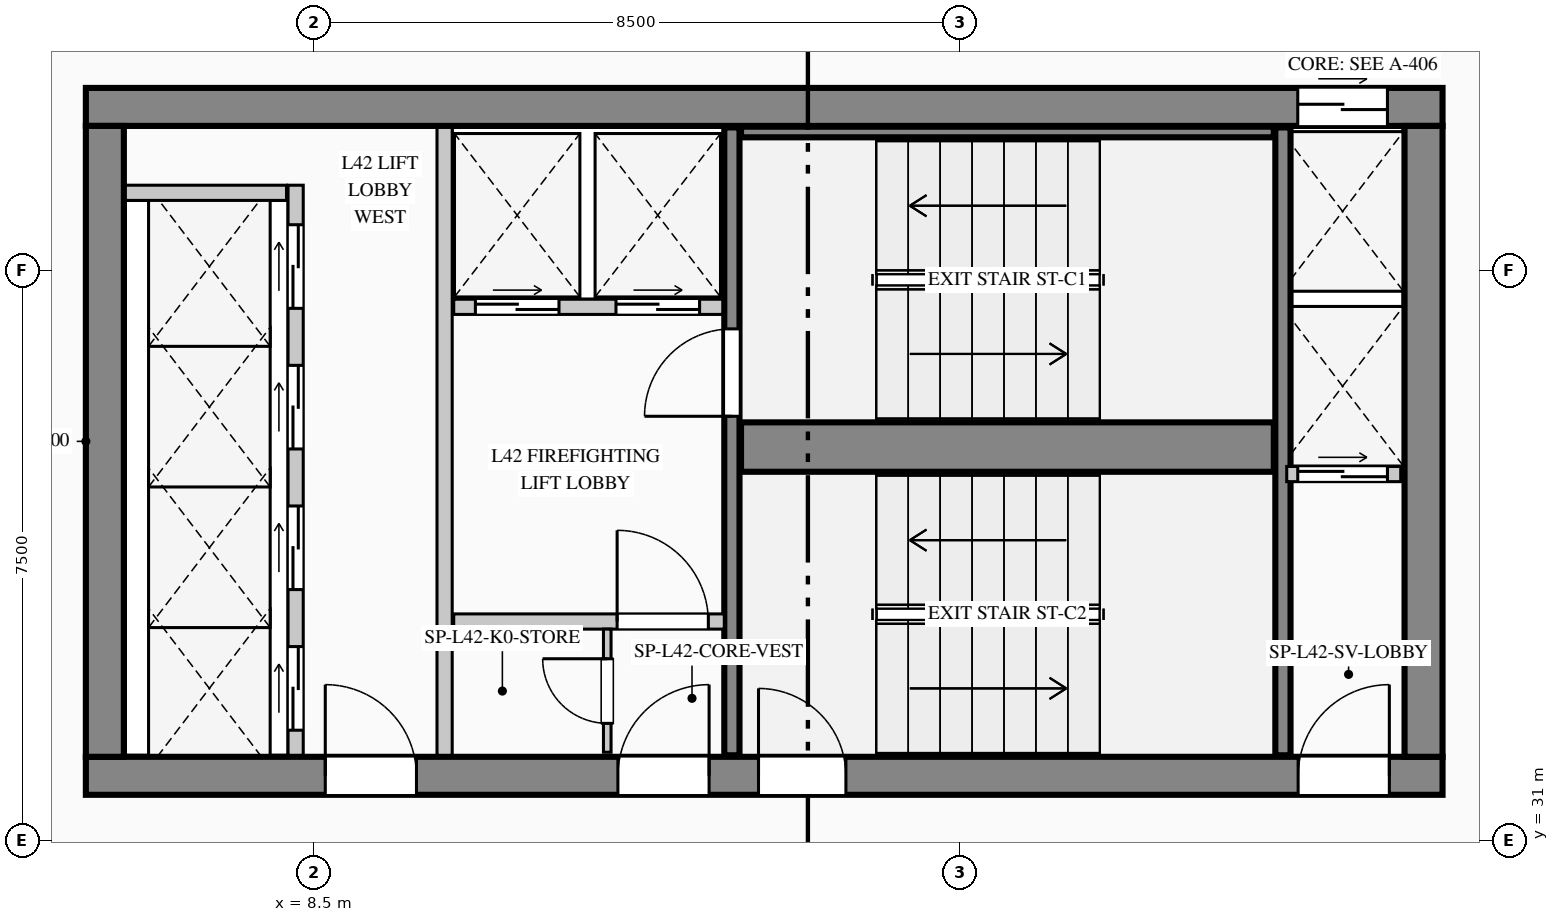
"""IFC4 building model, lengths in metres.
Left out: names, types, materials, properties, quantities, classifications, styles, units other than length and angle.
Written with IfcOpenShell. Run it as: python <this file> out.ifc"""

import sys

from ifc_helpers import new_model, si_unit, direction, frame, frame_2d, origin, place, context, subcontext, project, spatial, rectangle, extrude, element, fill, save


model = new_model("IFC4")
c1 = context("Model", 3, precision=1e-05, world=origin(), true_north=direction((0.0, 1.0)))
c2 = subcontext(c1, "Body", "Model", "MODEL_VIEW")
j1 = project(units=[si_unit("LENGTHUNIT", "METRE"), si_unit("PLANEANGLEUNIT", "RADIAN")], contexts=[c1])
p1 = place(None, origin())
s1 = spatial("IfcSite", under=j1, at=p1, CompositionType="ELEMENT")
p2 = place(p1, origin())
s2 = spatial("IfcBuilding", under=s1, at=p2, CompositionType="ELEMENT")
p3 = place(p2, frame((0.0, 0.0, 178.55)))
s3 = spatial("IfcBuildingStorey", under=s2, at=p3, CompositionType="ELEMENT", Elevation=178.55)
p4 = place(p3, frame((5.5, 40.65, 0.0), z_axis=(0.0, 0.0, 1.0), x_axis=(1.0, 0.0, 0.0)))
e1 = element("IfcWall", 1, at=p4, inside=s3, PredefinedType="SHEAR", context=c2, shape_type="SweptSolid", body=[
    extrude(rectangle(XDim=17.85, YDim=0.5, at=frame_2d((8.925, 0.0))), origin(), (0.0, 0.0, 1.0), 5.2),
])
p5 = place(p4, frame((15.945, 0.0, 0.0)))
e2 = element("IfcOpeningElement", 2, at=p5, cuts=e1, PredefinedType="OPENING", context=c2, shape_type="SweptSolid", body=[
    extrude(rectangle(XDim=1.18, YDim=2.25, at=frame_2d((0.59, 1.125))), frame((0.0, 0.26, 0.0), z_axis=(0.0, -1.0, 0.0), x_axis=(1.0, 0.0, 0.0)), (0.0, 0.0, 1.0), 0.52),
])
p6 = place(p3, frame((5.5, 31.85, 0.0), z_axis=(0.0, 0.0, 1.0), x_axis=(1.0, 0.0, 0.0)))
e3 = element("IfcWall", 3, at=p6, inside=s3, PredefinedType="SHEAR", context=c2, shape_type="SweptSolid", body=[
    extrude(rectangle(XDim=17.85, YDim=0.5, at=frame_2d((8.925, 0.0))), origin(), (0.0, 0.0, 1.0), 5.2),
])
p7 = place(p6, frame((3.15, 0.0, 0.0)))
e4 = element("IfcOpeningElement", 4, at=p7, cuts=e3, PredefinedType="OPENING", context=c2, shape_type="SweptSolid", body=[
    extrude(rectangle(XDim=1.2, YDim=2.2, at=frame_2d((0.6, 1.1))), frame((0.0, 0.26, 0.0), z_axis=(0.0, -1.0, 0.0), x_axis=(1.0, 0.0, 0.0)), (0.0, 0.0, 1.0), 0.52),
])
p8 = place(p6, frame((7.0, 0.0, 0.0)))
e5 = element("IfcOpeningElement", 5, at=p8, cuts=e3, PredefinedType="OPENING", context=c2, shape_type="SweptSolid", body=[
    extrude(rectangle(XDim=1.2, YDim=2.2, at=frame_2d((0.6, 1.1))), frame((0.0, 0.26, 0.0), z_axis=(0.0, -1.0, 0.0), x_axis=(1.0, 0.0, 0.0)), (0.0, 0.0, 1.0), 0.52),
])
p9 = place(p6, frame((8.85, 0.0, 0.0)))
e6 = element("IfcOpeningElement", 6, at=p9, cuts=e3, PredefinedType="OPENING", context=c2, shape_type="SweptSolid", body=[
    extrude(rectangle(XDim=1.15, YDim=2.2, at=frame_2d((0.575, 1.1))), frame((0.0, 0.26, 0.0), z_axis=(0.0, -1.0, 0.0), x_axis=(1.0, 0.0, 0.0)), (0.0, 0.0, 1.0), 0.52),
])
p10 = place(p6, frame((15.95, 0.0, 0.0)))
e7 = element("IfcOpeningElement", 7, at=p10, cuts=e3, PredefinedType="OPENING", context=c2, shape_type="SweptSolid", body=[
    extrude(rectangle(XDim=1.2, YDim=2.2, at=frame_2d((0.6, 1.1))), frame((0.0, 0.26, 0.0), z_axis=(0.0, -1.0, 0.0), x_axis=(1.0, 0.0, 0.0)), (0.0, 0.0, 1.0), 0.52),
])
for number, where, z_axis, x_axis in (
    (8, (5.75, 32.1, 0.0), (0.0, 0.0, 1.0), (0.0, 1.0, 0.0)),
    (9, (23.1, 32.1, 0.0), (0.0, 0.0, 1.0), (0.0, 1.0, 0.0)),
):
    element("IfcWall", number, at=place(p3, frame(where, z_axis=z_axis, x_axis=x_axis)), inside=s3, PredefinedType="SHEAR", context=c2, shape_type="SweptSolid", body=[
        extrude(rectangle(XDim=8.3, YDim=0.5, at=frame_2d((4.15, 0.0))), origin(), (0.0, 0.0, 1.0), 5.2),
    ])
p11 = place(p3, frame((14.0, 32.12, 0.0), z_axis=(0.0, 0.0, 1.0), x_axis=(0.0, 1.0, 0.0)))
e10 = element("IfcWall", 10, at=p11, inside=s3, PredefinedType="SHEAR", context=c2, shape_type="SweptSolid", body=[
    extrude(rectangle(XDim=8.26, YDim=0.2, at=frame_2d((4.13, 0.0))), origin(), (0.0, 0.0, 1.0), 5.2),
])
p12 = place(p11, frame((4.46, 0.0, 0.0)))
e11 = element("IfcOpeningElement", 11, at=p12, cuts=e10, PredefinedType="OPENING", context=c2, shape_type="SweptSolid", body=[
    extrude(rectangle(XDim=1.15, YDim=2.2, at=frame_2d((0.575, 1.1))), frame((0.0, 0.11, 0.0), z_axis=(0.0, -1.0, 0.0), x_axis=(1.0, 0.0, 0.0)), (0.0, 0.0, 1.0), 0.22),
])
p13 = place(p3, frame((14.12, 36.175, 0.0), z_axis=(0.0, 0.0, 1.0), x_axis=(1.0, 0.0, 0.0)))
e12 = element("IfcWall", 12, at=p13, inside=s3, PredefinedType="SHEAR", context=c2, shape_type="SweptSolid", body=[
    extrude(rectangle(XDim=7.01, YDim=0.65, at=frame_2d((3.505, 0.0))), origin(), (0.0, 0.0, 1.0), 5.2),
])
p14 = place(p3, frame((21.25, 32.12, 0.0), z_axis=(0.0, 0.0, 1.0), x_axis=(0.0, 1.0, 0.0)))
e13 = element("IfcWall", 13, at=p14, inside=s3, PredefinedType="SHEAR", context=c2, shape_type="SweptSolid", body=[
    extrude(rectangle(XDim=8.26, YDim=0.2, at=frame_2d((4.13, 0.0))), origin(), (0.0, 0.0, 1.0), 5.2),
])
p15 = place(p3, frame((14.12, 40.32, 0.0), z_axis=(0.0, 0.0, 1.0), x_axis=(1.0, 0.0, 0.0)))
e14 = element("IfcWall", 14, at=p15, inside=s3, PredefinedType="SHEAR", context=c2, shape_type="SweptSolid", body=[
    extrude(rectangle(XDim=7.01, YDim=0.14, at=frame_2d((3.505, 0.0))), origin(), (0.0, 0.0, 1.0), 5.2),
])
p16 = place(p3, frame((7.469, 4.63, 0.0), z_axis=(0.0, 0.0, 1.0), x_axis=(-0.123515300309, 0.992342667928, 0.0)))
e15 = element("IfcWall", 15, at=p16, inside=s3, PredefinedType="STANDARD", context=c2, shape_type="SweptSolid", body=[
    extrude(rectangle(XDim=37.024, YDim=0.26, at=frame_2d((18.512, 0.0))), origin(), (0.0, 0.0, 1.0), 4.95),
])
p17 = place(p3, frame((8.26, 32.12, 0.0), z_axis=(0.0, 0.0, 1.0), x_axis=(0.0, 1.0, 0.0)))
e16 = element("IfcWall", 16, at=p17, inside=s3, PredefinedType="PARTITIONING", context=c2, shape_type="SweptSolid", body=[
    extrude(rectangle(XDim=7.5, YDim=0.2, at=frame_2d((3.75, 0.0))), origin(), (0.0, 0.0, 1.0), 4.95),
])
p18 = place(p17, frame((0.33, 0.0, 0.0)))
e17 = element("IfcOpeningElement", 17, at=p18, cuts=e16, PredefinedType="OPENING", context=c2, shape_type="SweptSolid", body=[
    extrude(rectangle(XDim=1.1, YDim=2.2, at=frame_2d((0.55, 1.1))), frame((0.0, 0.11, 0.0), z_axis=(0.0, -1.0, 0.0), x_axis=(1.0, 0.0, 0.0)), (0.0, 0.0, 1.0), 0.22),
])
p19 = place(p17, frame((2.18, 0.0, 0.0)))
e18 = element("IfcOpeningElement", 18, at=p19, cuts=e16, PredefinedType="OPENING", context=c2, shape_type="SweptSolid", body=[
    extrude(rectangle(XDim=1.1, YDim=2.2, at=frame_2d((0.55, 1.1))), frame((0.0, 0.11, 0.0), z_axis=(0.0, -1.0, 0.0), x_axis=(1.0, 0.0, 0.0)), (0.0, 0.0, 1.0), 0.22),
])
p20 = place(p17, frame((4.03, 0.0, 0.0)))
e19 = element("IfcOpeningElement", 19, at=p20, cuts=e16, PredefinedType="OPENING", context=c2, shape_type="SweptSolid", body=[
    extrude(rectangle(XDim=1.1, YDim=2.2, at=frame_2d((0.55, 1.1))), frame((0.0, 0.11, 0.0), z_axis=(0.0, -1.0, 0.0), x_axis=(1.0, 0.0, 0.0)), (0.0, 0.0, 1.0), 0.22),
])
p21 = place(p17, frame((5.88, 0.0, 0.0)))
e20 = element("IfcOpeningElement", 20, at=p21, cuts=e16, PredefinedType="OPENING", context=c2, shape_type="SweptSolid", body=[
    extrude(rectangle(XDim=1.1, YDim=2.2, at=frame_2d((0.55, 1.1))), frame((0.0, 0.11, 0.0), z_axis=(0.0, -1.0, 0.0), x_axis=(1.0, 0.0, 0.0)), (0.0, 0.0, 1.0), 0.22),
])
p22 = place(p3, frame((6.02, 39.52, 0.0), z_axis=(0.0, 0.0, 1.0), x_axis=(1.0, 0.0, 0.0)))
e21 = element("IfcWall", 21, at=p22, inside=s3, PredefinedType="PARTITIONING", context=c2, shape_type="SweptSolid", body=[
    extrude(rectangle(XDim=2.12, YDim=0.2, at=frame_2d((1.06, 0.0))), origin(), (0.0, 0.0, 1.0), 4.95),
])
p23 = place(p3, frame((10.22, 32.12, 0.0), z_axis=(0.0, 0.0, 1.0), x_axis=(0.0, 1.0, 0.0)))
e22 = element("IfcWall", 22, at=p23, inside=s3, PredefinedType="PARTITIONING", context=c2, shape_type="SweptSolid", body=[
    extrude(rectangle(XDim=8.26, YDim=0.2, at=frame_2d((4.13, 0.0))), origin(), (0.0, 0.0, 1.0), 4.95),
])
p24 = place(p3, frame((10.34, 38.02, 0.0), z_axis=(0.0, 0.0, 1.0), x_axis=(1.0, 0.0, 0.0)))
e23 = element("IfcWall", 23, at=p24, inside=s3, PredefinedType="PARTITIONING", context=c2, shape_type="SweptSolid", body=[
    extrude(rectangle(XDim=3.54, YDim=0.2, at=frame_2d((1.77, 0.0))), origin(), (0.0, 0.0, 1.0), 4.95),
])
p25 = place(p24, frame((0.285, 0.0, 0.0)))
e24 = element("IfcOpeningElement", 24, at=p25, cuts=e23, PredefinedType="OPENING", context=c2, shape_type="SweptSolid", body=[
    extrude(rectangle(XDim=1.1, YDim=2.2, at=frame_2d((0.55, 1.1))), frame((0.0, 0.11, 0.0), z_axis=(0.0, -1.0, 0.0), x_axis=(1.0, 0.0, 0.0)), (0.0, 0.0, 1.0), 0.22),
])
p26 = place(p24, frame((2.135, 0.0, 0.0)))
e25 = element("IfcOpeningElement", 25, at=p26, cuts=e23, PredefinedType="OPENING", context=c2, shape_type="SweptSolid", body=[
    extrude(rectangle(XDim=1.1, YDim=2.2, at=frame_2d((0.55, 1.1))), frame((0.0, 0.11, 0.0), z_axis=(0.0, -1.0, 0.0), x_axis=(1.0, 0.0, 0.0)), (0.0, 0.0, 1.0), 0.22),
])
p27 = place(p3, frame((10.34, 33.88, 0.0), z_axis=(0.0, 0.0, 1.0), x_axis=(1.0, 0.0, 0.0)))
e26 = element("IfcWall", 26, at=p27, inside=s3, PredefinedType="PARTITIONING", context=c2, shape_type="SweptSolid", body=[
    extrude(rectangle(XDim=3.56, YDim=0.2, at=frame_2d((1.78, 0.0))), origin(), (0.0, 0.0, 1.0), 4.95),
])
p28 = place(p27, frame((2.15, 0.0, 0.0)))
e27 = element("IfcOpeningElement", 27, at=p28, cuts=e26, PredefinedType="OPENING", context=c2, shape_type="SweptSolid", body=[
    extrude(rectangle(XDim=1.2, YDim=2.2, at=frame_2d((0.6, 1.1))), frame((0.0, 0.11, 0.0), z_axis=(0.0, -1.0, 0.0), x_axis=(1.0, 0.0, 0.0)), (0.0, 0.0, 1.0), 0.22),
])
p29 = place(p3, frame((12.36, 32.16, 0.0), z_axis=(0.0, 0.0, 1.0), x_axis=(0.0, 1.0, 0.0)))
e28 = element("IfcWall", 28, at=p29, inside=s3, PredefinedType="PARTITIONING", context=c2, shape_type="SweptSolid", body=[
    extrude(rectangle(XDim=1.62, YDim=0.1, at=frame_2d((0.81, 0.0))), origin(), (0.0, 0.0, 1.0), 4.95),
])
p30 = place(p29, frame((0.38, 0.0, 0.0)))
e29 = element("IfcOpeningElement", 29, at=p30, cuts=e28, PredefinedType="OPENING", context=c2, shape_type="SweptSolid", body=[
    extrude(rectangle(XDim=0.85, YDim=2.1, at=frame_2d((0.425, 1.05))), frame((0.0, 0.06, 0.0), z_axis=(0.0, -1.0, 0.0), x_axis=(1.0, 0.0, 0.0)), (0.0, 0.0, 1.0), 0.12),
])
p31 = place(p3, frame((21.3, 35.82, 0.0), z_axis=(0.0, 0.0, 1.0), x_axis=(1.0, 0.0, 0.0)))
e30 = element("IfcWall", 30, at=p31, inside=s3, PredefinedType="PARTITIONING", context=c2, shape_type="SweptSolid", body=[
    extrude(rectangle(XDim=1.5, YDim=0.2, at=frame_2d((0.75, 0.0))), origin(), (0.0, 0.0, 1.0), 4.95),
])
p32 = place(p31, frame((0.145, 0.0, 0.0)))
e31 = element("IfcOpeningElement", 31, at=p32, cuts=e30, PredefinedType="OPENING", context=c2, shape_type="SweptSolid", body=[
    extrude(rectangle(XDim=1.18, YDim=2.25, at=frame_2d((0.59, 1.125))), frame((0.0, 0.11, 0.0), z_axis=(0.0, -1.0, 0.0), x_axis=(1.0, 0.0, 0.0)), (0.0, 0.0, 1.0), 0.22),
])
p33 = place(p7, origin())
e32 = element("IfcDoor", 32, at=p33, inside=s3, OperationType="SINGLE_SWING_LEFT", PredefinedType="DOOR", context=c2, shape_type="SweptSolid", body=[
    extrude(rectangle(XDim=1.2, YDim=2.2, at=frame_2d((0.6, 1.1))), frame((0.0, 0.025, 0.0), z_axis=(0.0, -1.0, 0.0), x_axis=(1.0, 0.0, 0.0)), (0.0, 0.0, 1.0), 0.05),
])
fill(e4, e32)
p34 = place(p8, origin())
e33 = element("IfcDoor", 33, at=p34, inside=s3, OperationType="SINGLE_SWING_RIGHT", PredefinedType="DOOR", context=c2, shape_type="SweptSolid", body=[
    extrude(rectangle(XDim=1.2, YDim=2.2, at=frame_2d((0.6, 1.1))), frame((0.0, 0.025, 0.0), z_axis=(0.0, -1.0, 0.0), x_axis=(1.0, 0.0, 0.0)), (0.0, 0.0, 1.0), 0.05),
])
fill(e5, e33)
p35 = place(p9, origin())
e34 = element("IfcDoor", 34, at=p35, inside=s3, OperationType="SINGLE_SWING_LEFT", PredefinedType="DOOR", context=c2, shape_type="SweptSolid", body=[
    extrude(rectangle(XDim=1.15, YDim=2.2, at=frame_2d((0.575, 1.1))), frame((0.0, 0.025, 0.0), z_axis=(0.0, -1.0, 0.0), x_axis=(1.0, 0.0, 0.0)), (0.0, 0.0, 1.0), 0.05),
])
fill(e6, e34)
p36 = place(p10, origin())
e35 = element("IfcDoor", 35, at=p36, inside=s3, OperationType="SINGLE_SWING_RIGHT", PredefinedType="DOOR", context=c2, shape_type="SweptSolid", body=[
    extrude(rectangle(XDim=1.2, YDim=2.2, at=frame_2d((0.6, 1.1))), frame((0.0, 0.025, 0.0), z_axis=(0.0, -1.0, 0.0), x_axis=(1.0, 0.0, 0.0)), (0.0, 0.0, 1.0), 0.05),
])
fill(e7, e35)
p37 = place(p28, origin())
e36 = element("IfcDoor", 36, at=p37, inside=s3, OperationType="SINGLE_SWING_LEFT", PredefinedType="DOOR", context=c2, shape_type="SweptSolid", body=[
    extrude(rectangle(XDim=1.2, YDim=2.2, at=frame_2d((0.6, 1.1))), frame((0.0, 0.025, 0.0), z_axis=(0.0, -1.0, 0.0), x_axis=(1.0, 0.0, 0.0)), (0.0, 0.0, 1.0), 0.05),
])
fill(e27, e36)
p38 = place(p30, origin())
e37 = element("IfcDoor", 37, at=p38, inside=s3, OperationType="SINGLE_SWING_RIGHT", PredefinedType="DOOR", context=c2, shape_type="SweptSolid", body=[
    extrude(rectangle(XDim=0.85, YDim=2.1, at=frame_2d((0.425, 1.05))), frame((0.0, 0.025, 0.0), z_axis=(0.0, -1.0, 0.0), x_axis=(1.0, 0.0, 0.0)), (0.0, 0.0, 1.0), 0.05),
])
fill(e29, e37)
p39 = place(p12, origin())
e38 = element("IfcDoor", 38, at=p39, inside=s3, OperationType="SINGLE_SWING_LEFT", PredefinedType="DOOR", context=c2, shape_type="SweptSolid", body=[
    extrude(rectangle(XDim=1.15, YDim=2.2, at=frame_2d((0.575, 1.1))), frame((0.0, 0.025, 0.0), z_axis=(0.0, -1.0, 0.0), x_axis=(1.0, 0.0, 0.0)), (0.0, 0.0, 1.0), 0.05),
])
fill(e11, e38)
p40 = place(p18, origin())
e39 = element("IfcDoor", 39, at=p40, inside=s3, OperationType="DOUBLE_DOOR_SLIDING", PredefinedType="DOOR", context=c2, shape_type="SweptSolid", body=[
    extrude(rectangle(XDim=1.1, YDim=2.2, at=frame_2d((0.55, 1.1))), frame((0.0, 0.025, 0.0), z_axis=(0.0, -1.0, 0.0), x_axis=(1.0, 0.0, 0.0)), (0.0, 0.0, 1.0), 0.05),
])
fill(e17, e39)
p41 = place(p19, origin())
e40 = element("IfcDoor", 40, at=p41, inside=s3, OperationType="DOUBLE_DOOR_SLIDING", PredefinedType="DOOR", context=c2, shape_type="SweptSolid", body=[
    extrude(rectangle(XDim=1.1, YDim=2.2, at=frame_2d((0.55, 1.1))), frame((0.0, 0.025, 0.0), z_axis=(0.0, -1.0, 0.0), x_axis=(1.0, 0.0, 0.0)), (0.0, 0.0, 1.0), 0.05),
])
fill(e18, e40)
p42 = place(p20, origin())
e41 = element("IfcDoor", 41, at=p42, inside=s3, OperationType="DOUBLE_DOOR_SLIDING", PredefinedType="DOOR", context=c2, shape_type="SweptSolid", body=[
    extrude(rectangle(XDim=1.1, YDim=2.2, at=frame_2d((0.55, 1.1))), frame((0.0, 0.025, 0.0), z_axis=(0.0, -1.0, 0.0), x_axis=(1.0, 0.0, 0.0)), (0.0, 0.0, 1.0), 0.05),
])
fill(e19, e41)
p43 = place(p21, origin())
e42 = element("IfcDoor", 42, at=p43, inside=s3, OperationType="DOUBLE_DOOR_SLIDING", PredefinedType="DOOR", context=c2, shape_type="SweptSolid", body=[
    extrude(rectangle(XDim=1.1, YDim=2.2, at=frame_2d((0.55, 1.1))), frame((0.0, 0.025, 0.0), z_axis=(0.0, -1.0, 0.0), x_axis=(1.0, 0.0, 0.0)), (0.0, 0.0, 1.0), 0.05),
])
fill(e20, e42)
p44 = place(p25, origin())
e43 = element("IfcDoor", 43, at=p44, inside=s3, OperationType="DOUBLE_DOOR_SLIDING", PredefinedType="DOOR", context=c2, shape_type="SweptSolid", body=[
    extrude(rectangle(XDim=1.1, YDim=2.2, at=frame_2d((0.55, 1.1))), frame((0.0, 0.025, 0.0), z_axis=(0.0, -1.0, 0.0), x_axis=(1.0, 0.0, 0.0)), (0.0, 0.0, 1.0), 0.05),
])
fill(e24, e43)
p45 = place(p26, origin())
e44 = element("IfcDoor", 44, at=p45, inside=s3, OperationType="DOUBLE_DOOR_SLIDING", PredefinedType="DOOR", context=c2, shape_type="SweptSolid", body=[
    extrude(rectangle(XDim=1.1, YDim=2.2, at=frame_2d((0.55, 1.1))), frame((0.0, 0.025, 0.0), z_axis=(0.0, -1.0, 0.0), x_axis=(1.0, 0.0, 0.0)), (0.0, 0.0, 1.0), 0.05),
])
fill(e25, e44)
p46 = place(p5, origin())
e45 = element("IfcDoor", 45, at=p46, inside=s3, OperationType="DOUBLE_DOOR_SLIDING", PredefinedType="DOOR", context=c2, shape_type="SweptSolid", body=[
    extrude(rectangle(XDim=1.18, YDim=2.25, at=frame_2d((0.59, 1.125))), frame((0.0, 0.025, 0.0), z_axis=(0.0, -1.0, 0.0), x_axis=(1.0, 0.0, 0.0)), (0.0, 0.0, 1.0), 0.05),
])
fill(e2, e45)
p47 = place(p32, origin())
e46 = element("IfcDoor", 46, at=p47, inside=s3, OperationType="DOUBLE_DOOR_SLIDING", PredefinedType="DOOR", context=c2, shape_type="SweptSolid", body=[
    extrude(rectangle(XDim=1.18, YDim=2.25, at=frame_2d((0.59, 1.125))), frame((0.0, 0.025, 0.0), z_axis=(0.0, -1.0, 0.0), x_axis=(1.0, 0.0, 0.0)), (0.0, 0.0, 1.0), 0.05),
])
fill(e31, e46)
save(model, sys.argv[1])
